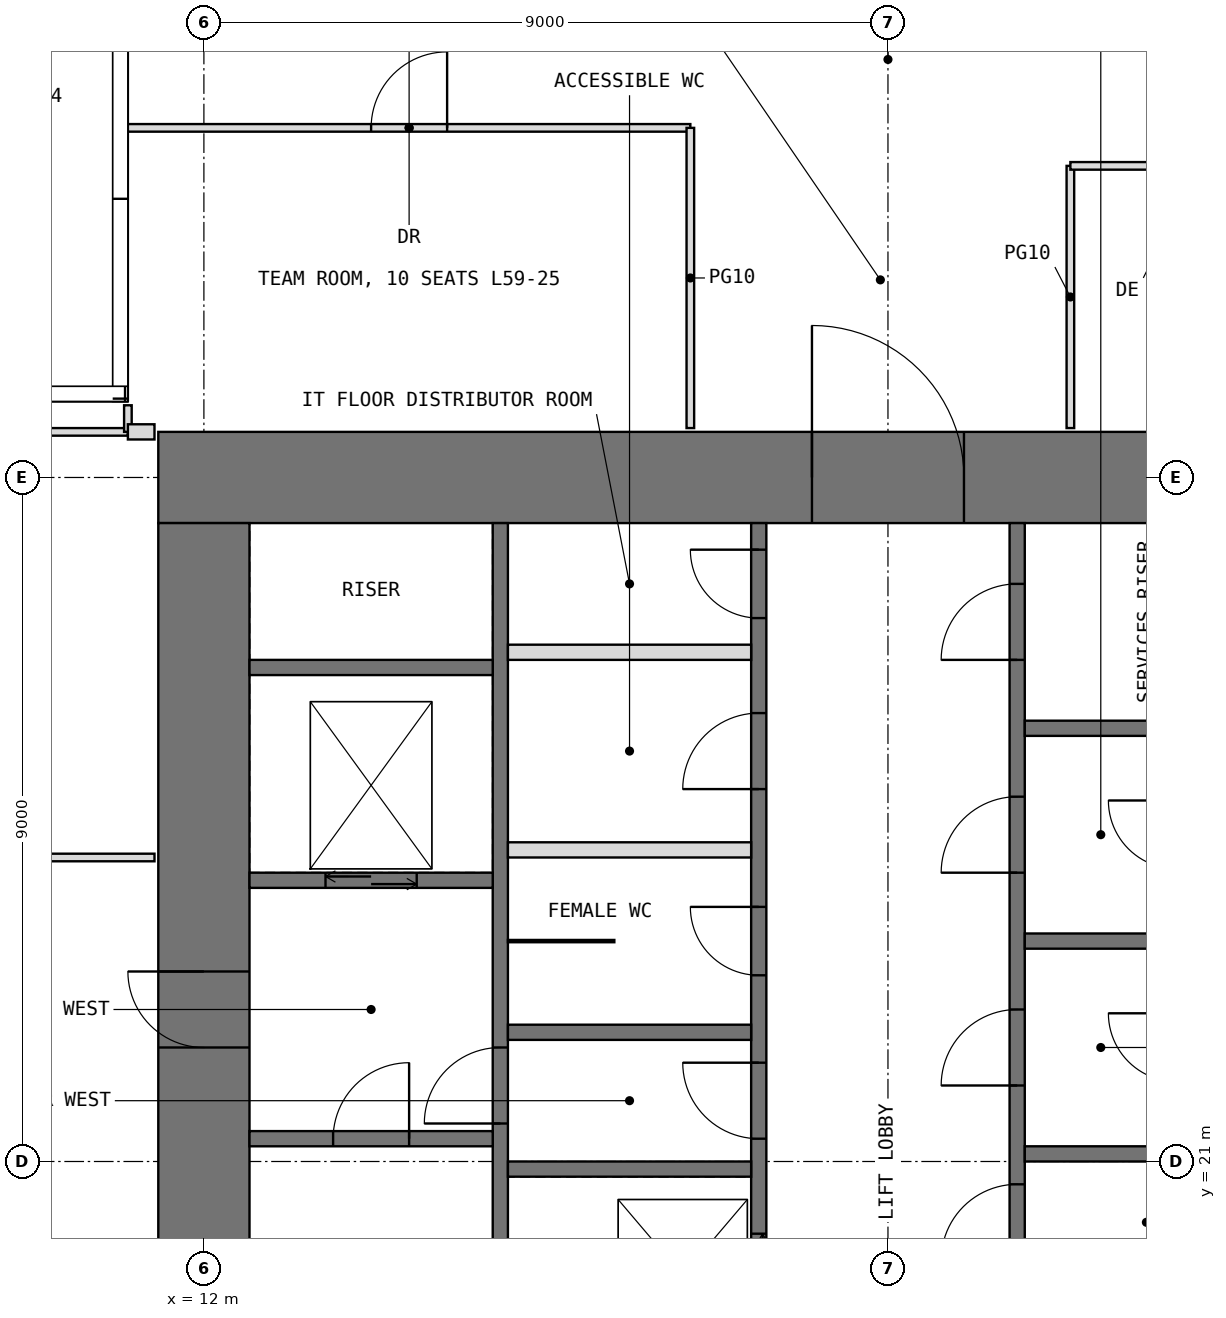
"""IFC4 building model, lengths in metres.
Left out: names, types, materials, properties, quantities, classifications, styles, units other than length and angle.
Written with IfcOpenShell. Run it as: python <this file> out.ifc"""

import sys

from ifc_helpers import new_model, si_unit, direction, frame, frame_2d, origin, place, context, subcontext, project, spatial, rectangle, extrude, element, fill, save


model = new_model("IFC4")
c1 = context("Model", 3, precision=1e-05, world=origin(), true_north=direction((0.0, 1.0)))
c2 = subcontext(c1, "Body", "Model", "MODEL_VIEW")
j1 = project(units=[si_unit("LENGTHUNIT", "METRE"), si_unit("PLANEANGLEUNIT", "RADIAN")], contexts=[c1])
p1 = place(None, origin())
s1 = spatial("IfcSite", under=j1, at=p1, CompositionType="ELEMENT")
p2 = place(p1, origin())
s2 = spatial("IfcBuilding", under=s1, at=p2, CompositionType="ELEMENT")
p3 = place(p2, frame((0.0, 0.0, 248.2)))
s3 = spatial("IfcBuildingStorey", under=s2, at=p3, CompositionType="ELEMENT", Elevation=248.2)
p4 = place(p3, frame((11.4, 30.0, -0.05), z_axis=(0.0, 0.0, 1.0), x_axis=(1.0, 0.0, 0.0)))
e1 = element("IfcWall", 1, at=p4, inside=s3, PredefinedType="SHEAR", context=c2, shape_type="SweptSolid", body=[
    extrude(rectangle(XDim=19.2, YDim=1.2, at=frame_2d((9.6, 0.0))), origin(), (0.0, 0.0, 1.0), 4.2),
])
p5 = place(p4, frame((8.6, 0.0, 0.05)))
e2 = element("IfcOpeningElement", 2, at=p5, cuts=e1, PredefinedType="OPENING", context=c2, shape_type="SweptSolid", body=[
    extrude(rectangle(XDim=2.0, YDim=2.2, at=frame_2d((1.0, 1.1))), frame((0.0, 0.61, 0.0), z_axis=(0.0, -1.0, 0.0), x_axis=(1.0, 0.0, 0.0)), (0.0, 0.0, 1.0), 1.22),
])
p6 = place(p3, frame((12.0, 12.6, -0.05), z_axis=(0.0, 0.0, 1.0), x_axis=(0.0, 1.0, 0.0)))
e3 = element("IfcWall", 3, at=p6, inside=s3, PredefinedType="SHEAR", context=c2, shape_type="SweptSolid", body=[
    extrude(rectangle(XDim=16.8, YDim=1.2, at=frame_2d((8.4, 0.0))), origin(), (0.0, 0.0, 1.0), 4.2),
])
p7 = place(p6, frame((9.9, 0.0, 0.05)))
e4 = element("IfcOpeningElement", 4, at=p7, cuts=e3, PredefinedType="OPENING", context=c2, shape_type="SweptSolid", body=[
    extrude(rectangle(XDim=1.0, YDim=2.2, at=frame_2d((0.5, 1.1))), frame((0.0, 0.61, 0.0), z_axis=(0.0, -1.0, 0.0), x_axis=(1.0, 0.0, 0.0)), (0.0, 0.0, 1.0), 1.22),
])
p8 = place(p3, frame((15.9, 12.6, -0.05), z_axis=(0.0, 0.0, 1.0), x_axis=(0.0, 1.0, 0.0)))
e5 = element("IfcWall", 5, at=p8, inside=s3, PredefinedType="SHEAR", context=c2, shape_type="SweptSolid", body=[
    extrude(rectangle(XDim=16.8, YDim=0.2, at=frame_2d((8.4, 0.0))), origin(), (0.0, 0.0, 1.0), 4.2),
])
p9 = place(p8, frame((8.9, 0.0, 0.05)))
e6 = element("IfcOpeningElement", 6, at=p9, cuts=e5, PredefinedType="OPENING", context=c2, shape_type="SweptSolid", body=[
    extrude(rectangle(XDim=1.0, YDim=2.2, at=frame_2d((0.5, 1.1))), frame((0.0, 0.11, 0.0), z_axis=(0.0, -1.0, 0.0), x_axis=(1.0, 0.0, 0.0)), (0.0, 0.0, 1.0), 0.22),
])
p10 = place(p3, frame((19.3, 12.6, -0.05), z_axis=(0.0, 0.0, 1.0), x_axis=(0.0, 1.0, 0.0)))
e7 = element("IfcWall", 7, at=p10, inside=s3, PredefinedType="SHEAR", context=c2, shape_type="SweptSolid", body=[
    extrude(rectangle(XDim=16.8, YDim=0.2, at=frame_2d((8.4, 0.0))), origin(), (0.0, 0.0, 1.0), 4.2),
])
p11 = place(p10, frame((8.7, 0.0, 0.05)))
e8 = element("IfcOpeningElement", 8, at=p11, cuts=e7, PredefinedType="OPENING", context=c2, shape_type="SweptSolid", body=[
    extrude(rectangle(XDim=1.0, YDim=2.2, at=frame_2d((0.5, 1.1))), frame((0.0, 0.11, 0.0), z_axis=(0.0, -1.0, 0.0), x_axis=(1.0, 0.0, 0.0)), (0.0, 0.0, 1.0), 0.22),
])
p12 = place(p10, frame((10.85, 0.0, 0.05)))
e9 = element("IfcOpeningElement", 9, at=p12, cuts=e7, PredefinedType="OPENING", context=c2, shape_type="SweptSolid", body=[
    extrude(rectangle(XDim=0.9, YDim=2.2, at=frame_2d((0.45, 1.1))), frame((0.0, 0.11, 0.0), z_axis=(0.0, -1.0, 0.0), x_axis=(1.0, 0.0, 0.0)), (0.0, 0.0, 1.0), 0.22),
])
p13 = place(p10, frame((13.3, 0.0, 0.05)))
e10 = element("IfcOpeningElement", 10, at=p13, cuts=e7, PredefinedType="OPENING", context=c2, shape_type="SweptSolid", body=[
    extrude(rectangle(XDim=1.0, YDim=2.2, at=frame_2d((0.5, 1.1))), frame((0.0, 0.11, 0.0), z_axis=(0.0, -1.0, 0.0), x_axis=(1.0, 0.0, 0.0)), (0.0, 0.0, 1.0), 0.22),
])
p14 = place(p10, frame((15.55, 0.0, 0.05)))
e11 = element("IfcOpeningElement", 11, at=p14, cuts=e7, PredefinedType="OPENING", context=c2, shape_type="SweptSolid", body=[
    extrude(rectangle(XDim=0.9, YDim=2.2, at=frame_2d((0.45, 1.1))), frame((0.0, 0.11, 0.0), z_axis=(0.0, -1.0, 0.0), x_axis=(1.0, 0.0, 0.0)), (0.0, 0.0, 1.0), 0.22),
])
p15 = place(p10, frame((0.75, 0.0, 0.05)))
e12 = element("IfcOpeningElement", 12, at=p15, cuts=e7, PredefinedType="OPENING", context=c2, shape_type="SweptSolid", body=[
    extrude(rectangle(XDim=1.1, YDim=2.2, at=frame_2d((0.55, 1.1))), frame((0.0, 0.11, 0.0), z_axis=(0.0, -1.0, 0.0), x_axis=(1.0, 0.0, 0.0)), (0.0, 0.0, 1.0), 0.22),
])
p16 = place(p10, frame((3.55, 0.0, 0.05)))
e13 = element("IfcOpeningElement", 13, at=p16, cuts=e7, PredefinedType="OPENING", context=c2, shape_type="SweptSolid", body=[
    extrude(rectangle(XDim=1.1, YDim=2.2, at=frame_2d((0.55, 1.1))), frame((0.0, 0.11, 0.0), z_axis=(0.0, -1.0, 0.0), x_axis=(1.0, 0.0, 0.0)), (0.0, 0.0, 1.0), 0.22),
])
p17 = place(p10, frame((6.35, 0.0, 0.05)))
e14 = element("IfcOpeningElement", 14, at=p17, cuts=e7, PredefinedType="OPENING", context=c2, shape_type="SweptSolid", body=[
    extrude(rectangle(XDim=1.1, YDim=2.2, at=frame_2d((0.55, 1.1))), frame((0.0, 0.11, 0.0), z_axis=(0.0, -1.0, 0.0), x_axis=(1.0, 0.0, 0.0)), (0.0, 0.0, 1.0), 0.22),
])
p18 = place(p3, frame((22.7, 12.6, -0.05), z_axis=(0.0, 0.0, 1.0), x_axis=(0.0, 1.0, 0.0)))
e15 = element("IfcWall", 15, at=p18, inside=s3, PredefinedType="SHEAR", context=c2, shape_type="SweptSolid", body=[
    extrude(rectangle(XDim=16.8, YDim=0.2, at=frame_2d((8.4, 0.0))), origin(), (0.0, 0.0, 1.0), 4.2),
])
p19 = place(p18, frame((0.45, 0.0, 0.05)))
e16 = element("IfcOpeningElement", 16, at=p19, cuts=e15, PredefinedType="OPENING", context=c2, shape_type="SweptSolid", body=[
    extrude(rectangle(XDim=0.9, YDim=2.2, at=frame_2d((0.45, 1.1))), frame((0.0, 0.11, 0.0), z_axis=(0.0, -1.0, 0.0), x_axis=(1.0, 0.0, 0.0)), (0.0, 0.0, 1.0), 0.22),
])
p20 = place(p18, frame((7.1, 0.0, 0.05)))
e17 = element("IfcOpeningElement", 17, at=p20, cuts=e15, PredefinedType="OPENING", context=c2, shape_type="SweptSolid", body=[
    extrude(rectangle(XDim=1.0, YDim=2.2, at=frame_2d((0.5, 1.1))), frame((0.0, 0.11, 0.0), z_axis=(0.0, -1.0, 0.0), x_axis=(1.0, 0.0, 0.0)), (0.0, 0.0, 1.0), 0.22),
])
p21 = place(p18, frame((1.95, 0.0, 0.05)))
e18 = element("IfcOpeningElement", 18, at=p21, cuts=e15, PredefinedType="OPENING", context=c2, shape_type="SweptSolid", body=[
    extrude(rectangle(XDim=0.9, YDim=2.2, at=frame_2d((0.45, 1.1))), frame((0.0, 0.11, 0.0), z_axis=(0.0, -1.0, 0.0), x_axis=(1.0, 0.0, 0.0)), (0.0, 0.0, 1.0), 0.22),
])
p22 = place(p18, frame((4.95, 0.0, 0.05)))
e19 = element("IfcOpeningElement", 19, at=p22, cuts=e15, PredefinedType="OPENING", context=c2, shape_type="SweptSolid", body=[
    extrude(rectangle(XDim=0.9, YDim=2.2, at=frame_2d((0.45, 1.1))), frame((0.0, 0.11, 0.0), z_axis=(0.0, -1.0, 0.0), x_axis=(1.0, 0.0, 0.0)), (0.0, 0.0, 1.0), 0.22),
])
p23 = place(p18, frame((9.4, 0.0, 0.05)))
e20 = element("IfcOpeningElement", 20, at=p23, cuts=e15, PredefinedType="OPENING", context=c2, shape_type="SweptSolid", body=[
    extrude(rectangle(XDim=1.0, YDim=2.2, at=frame_2d((0.5, 1.1))), frame((0.0, 0.11, 0.0), z_axis=(0.0, -1.0, 0.0), x_axis=(1.0, 0.0, 0.0)), (0.0, 0.0, 1.0), 0.22),
])
p24 = place(p18, frame((12.2, 0.0, 0.05)))
e21 = element("IfcOpeningElement", 21, at=p24, cuts=e15, PredefinedType="OPENING", context=c2, shape_type="SweptSolid", body=[
    extrude(rectangle(XDim=1.0, YDim=2.2, at=frame_2d((0.5, 1.1))), frame((0.0, 0.11, 0.0), z_axis=(0.0, -1.0, 0.0), x_axis=(1.0, 0.0, 0.0)), (0.0, 0.0, 1.0), 0.22),
])
p25 = place(p18, frame((15.0, 0.0, 0.05)))
e22 = element("IfcOpeningElement", 22, at=p25, cuts=e15, PredefinedType="OPENING", context=c2, shape_type="SweptSolid", body=[
    extrude(rectangle(XDim=1.0, YDim=2.2, at=frame_2d((0.5, 1.1))), frame((0.0, 0.11, 0.0), z_axis=(0.0, -1.0, 0.0), x_axis=(1.0, 0.0, 0.0)), (0.0, 0.0, 1.0), 0.22),
])
p26 = place(p3, frame((12.6, 21.3, -0.05), z_axis=(0.0, 0.0, 1.0), x_axis=(1.0, 0.0, 0.0)))
e23 = element("IfcWall", 23, at=p26, inside=s3, PredefinedType="SHEAR", context=c2, shape_type="SweptSolid", body=[
    extrude(rectangle(XDim=3.2, YDim=0.2, at=frame_2d((1.6, 0.0))), origin(), (0.0, 0.0, 1.0), 4.2),
])
p27 = place(p26, frame((1.1, 0.0, 0.05)))
e24 = element("IfcOpeningElement", 24, at=p27, cuts=e23, PredefinedType="OPENING", context=c2, shape_type="SweptSolid", body=[
    extrude(rectangle(XDim=1.0, YDim=2.2, at=frame_2d((0.5, 1.1))), frame((0.0, 0.11, 0.0), z_axis=(0.0, -1.0, 0.0), x_axis=(1.0, 0.0, 0.0)), (0.0, 0.0, 1.0), 0.22),
])
p28 = place(p3, frame((12.6, 24.7, -0.05), z_axis=(0.0, 0.0, 1.0), x_axis=(1.0, 0.0, 0.0)))
e25 = element("IfcWall", 25, at=p28, inside=s3, PredefinedType="SHEAR", context=c2, shape_type="SweptSolid", body=[
    extrude(rectangle(XDim=3.2, YDim=0.2, at=frame_2d((1.6, 0.0))), origin(), (0.0, 0.0, 1.0), 4.2),
])
p29 = place(p28, frame((1.0, 0.0, 0.05)))
e26 = element("IfcOpeningElement", 26, at=p29, cuts=e25, PredefinedType="OPENING", context=c2, shape_type="SweptSolid", body=[
    extrude(rectangle(XDim=1.2, YDim=2.2, at=frame_2d((0.6, 1.1))), frame((0.0, 0.11, 0.0), z_axis=(0.0, -1.0, 0.0), x_axis=(1.0, 0.0, 0.0)), (0.0, 0.0, 1.0), 0.22),
])
for number, where, z_axis, x_axis in (
    (27, (12.6, 27.5, -0.05), (0.0, 0.0, 1.0), (1.0, 0.0, 0.0)),
    (28, (16.0, 20.9, -0.05), (0.0, 0.0, 1.0), (1.0, 0.0, 0.0)),
    (29, (16.0, 22.7, -0.05), (0.0, 0.0, 1.0), (1.0, 0.0, 0.0)),
):
    element("IfcWall", number, at=place(p3, frame(where, z_axis=z_axis, x_axis=x_axis)), inside=s3, PredefinedType="SHEAR", context=c2, shape_type="SweptSolid", body=[
        extrude(rectangle(XDim=3.2, YDim=0.2, at=frame_2d((1.6, 0.0))), origin(), (0.0, 0.0, 1.0), 4.2),
    ])
for number, where, z_axis, x_axis in (
    (30, (16.0, 25.1, 0.0), (0.0, 0.0, 1.0), (1.0, 0.0, 0.0)),
    (31, (16.0, 27.7, 0.0), (0.0, 0.0, 1.0), (1.0, 0.0, 0.0)),
):
    element("IfcWall", number, at=place(p3, frame(where, z_axis=z_axis, x_axis=x_axis)), inside=s3, PredefinedType="PARTITIONING", context=c2, shape_type="SweptSolid", body=[
        extrude(rectangle(XDim=3.2, YDim=0.2, at=frame_2d((1.6, 0.0))), origin(), (0.0, 0.0, 1.0), 3.95),
    ])
for number, where, z_axis, x_axis in (
    (32, (22.8, 21.1, -0.05), (0.0, 0.0, 1.0), (1.0, 0.0, 0.0)),
    (33, (22.8, 23.9, -0.05), (0.0, 0.0, 1.0), (1.0, 0.0, 0.0)),
    (34, (22.8, 26.7, -0.05), (0.0, 0.0, 1.0), (1.0, 0.0, 0.0)),
):
    element("IfcWall", number, at=place(p3, frame(where, z_axis=z_axis, x_axis=x_axis)), inside=s3, PredefinedType="SHEAR", context=c2, shape_type="SweptSolid", body=[
        extrude(rectangle(XDim=3.2, YDim=0.2, at=frame_2d((1.6, 0.0))), origin(), (0.0, 0.0, 1.0), 4.2),
    ])
p30 = place(p3, frame((16.0, 23.9, 0.0), z_axis=(0.0, 0.0, 1.0), x_axis=(1.0, 0.0, 0.0)))
e35 = element("IfcWall", 35, at=p30, inside=s3, PredefinedType="PARTITIONING", context=c2, shape_type="SweptSolid", body=[
    extrude(rectangle(XDim=1.4, YDim=0.03, at=frame_2d((0.7, 0.0))), origin(), (0.0, 0.0, 1.0), 3.95),
])
p31 = place(p3, frame((8.0, 25.0, 0.0), z_axis=(0.0, 0.0, 1.0), x_axis=(1.0, 0.0, 0.0)))
e36 = element("IfcWall", 36, at=p31, inside=s3, PredefinedType="PARTITIONING", context=c2, shape_type="SweptSolid", body=[
    extrude(rectangle(XDim=3.35, YDim=0.1, at=frame_2d((1.675, 0.0))), origin(), (0.0, 0.0, 1.0), 3.95),
])
p32 = place(p3, frame((8.0, 30.6, 0.0), z_axis=(0.0, 0.0, 1.0), x_axis=(1.0, 0.0, 0.0)))
e37 = element("IfcWall", 37, at=p32, inside=s3, PredefinedType="PARTITIONING", context=c2, shape_type="SweptSolid", body=[
    extrude(rectangle(XDim=3.0, YDim=0.1, at=frame_2d((1.5, 0.0))), origin(), (0.0, 0.0, 1.0), 3.95),
])
p33 = place(p3, frame((11.0, 30.6, 0.0), z_axis=(0.0, 0.0, 1.0), x_axis=(0.0, 1.0, 0.0)))
e38 = element("IfcWall", 38, at=p33, inside=s3, PredefinedType="PARTITIONING", context=c2, shape_type="SweptSolid", body=[
    extrude(rectangle(XDim=0.35, YDim=0.1, at=frame_2d((0.175, 0.0))), origin(), (0.0, 0.0, 1.0), 3.95),
])
p34 = place(p3, frame((11.0, 30.6, 0.0), z_axis=(0.0, 0.0, 1.0), x_axis=(1.0, 0.0, 0.0)))
e39 = element("IfcWall", 39, at=p34, inside=s3, PredefinedType="PARTITIONING", context=c2, shape_type="SweptSolid", body=[
    extrude(rectangle(XDim=0.35, YDim=0.2, at=frame_2d((0.175, 0.0))), origin(), (0.0, 0.0, 1.0), 3.95),
])
p35 = place(p3, frame((11.0, 34.6, 0.0), z_axis=(0.0, 0.0, 1.0), x_axis=(1.0, 0.0, 0.0)))
e40 = element("IfcWall", 40, at=p35, inside=s3, PredefinedType="PARTITIONING", context=c2, shape_type="SweptSolid", body=[
    extrude(rectangle(XDim=7.4, YDim=0.1, at=frame_2d((3.7, 0.0))), origin(), (0.0, 0.0, 1.0), 3.95),
])
p36 = place(p35, frame((3.2, 0.0, 0.0)))
e41 = element("IfcOpeningElement", 41, at=p36, cuts=e40, PredefinedType="OPENING", context=c2, shape_type="SweptSolid", body=[
    extrude(rectangle(XDim=1.0, YDim=2.2, at=frame_2d((0.5, 1.1))), frame((0.0, 0.06, 0.0), z_axis=(0.0, -1.0, 0.0), x_axis=(1.0, 0.0, 0.0)), (0.0, 0.0, 1.0), 0.12),
])
p37 = place(p3, frame((18.4, 30.65, 0.0), z_axis=(0.0, 0.0, 1.0), x_axis=(0.0, 1.0, 0.0)))
e42 = element("IfcWall", 42, at=p37, inside=s3, PredefinedType="PARTITIONING", context=c2, shape_type="SweptSolid", body=[
    extrude(rectangle(XDim=3.95, YDim=0.1, at=frame_2d((1.975, 0.0))), origin(), (0.0, 0.0, 1.0), 3.95),
])
p38 = place(p3, frame((23.4, 30.65, 0.0), z_axis=(0.0, 0.0, 1.0), x_axis=(0.0, 1.0, 0.0)))
e43 = element("IfcWall", 43, at=p38, inside=s3, PredefinedType="PARTITIONING", context=c2, shape_type="SweptSolid", body=[
    extrude(rectangle(XDim=3.45, YDim=0.1, at=frame_2d((1.725, 0.0))), origin(), (0.0, 0.0, 1.0), 3.95),
])
p39 = place(p3, frame((23.4, 34.1, 0.0), z_axis=(0.0, 0.0, 1.0), x_axis=(1.0, 0.0, 0.0)))
e44 = element("IfcWall", 44, at=p39, inside=s3, PredefinedType="PARTITIONING", context=c2, shape_type="SweptSolid", body=[
    extrude(rectangle(XDim=3.4, YDim=0.1, at=frame_2d((1.7, 0.0))), origin(), (0.0, 0.0, 1.0), 3.95),
])
p40 = place(p39, frame((1.15, 0.0, 0.0)))
e45 = element("IfcOpeningElement", 45, at=p40, cuts=e44, PredefinedType="OPENING", context=c2, shape_type="SweptSolid", body=[
    extrude(rectangle(XDim=1.1, YDim=2.3, at=frame_2d((0.55, 1.15))), frame((0.0, 0.06, 0.0), z_axis=(0.0, -1.0, 0.0), x_axis=(1.0, 0.0, 0.0)), (0.0, 0.0, 1.0), 0.12),
])
p41 = place(p5, origin())
e46 = element("IfcDoor", 46, at=p41, inside=s3, OperationType="DOUBLE_DOOR_SINGLE_SWING", PredefinedType="DOOR", context=c2, shape_type="SweptSolid", body=[
    extrude(rectangle(XDim=2.0, YDim=2.2, at=frame_2d((1.0, 1.1))), frame((0.0, 0.025, 0.0), z_axis=(0.0, -1.0, 0.0), x_axis=(1.0, 0.0, 0.0)), (0.0, 0.0, 1.0), 0.05),
])
fill(e2, e46)
p42 = place(p7, origin())
e47 = element("IfcDoor", 47, at=p42, inside=s3, OperationType="SINGLE_SWING_RIGHT", PredefinedType="DOOR", context=c2, shape_type="SweptSolid", body=[
    extrude(rectangle(XDim=1.0, YDim=2.2, at=frame_2d((0.5, 1.1))), frame((0.0, 0.025, 0.0), z_axis=(0.0, -1.0, 0.0), x_axis=(1.0, 0.0, 0.0)), (0.0, 0.0, 1.0), 0.05),
])
fill(e4, e47)
p43 = place(p27, origin())
e48 = element("IfcDoor", 48, at=p43, inside=s3, OperationType="SINGLE_SWING_RIGHT", PredefinedType="DOOR", context=c2, shape_type="SweptSolid", body=[
    extrude(rectangle(XDim=1.0, YDim=2.2, at=frame_2d((0.5, 1.1))), frame((0.0, 0.025, 0.0), z_axis=(0.0, -1.0, 0.0), x_axis=(1.0, 0.0, 0.0)), (0.0, 0.0, 1.0), 0.05),
])
fill(e24, e48)
p44 = place(p9, origin())
e49 = element("IfcDoor", 49, at=p44, inside=s3, OperationType="SINGLE_SWING_LEFT", PredefinedType="DOOR", context=c2, shape_type="SweptSolid", body=[
    extrude(rectangle(XDim=1.0, YDim=2.2, at=frame_2d((0.5, 1.1))), frame((0.0, 0.025, 0.0), z_axis=(0.0, -1.0, 0.0), x_axis=(1.0, 0.0, 0.0)), (0.0, 0.0, 1.0), 0.05),
])
fill(e6, e49)
p45 = place(p11, origin())
e50 = element("IfcDoor", 50, at=p45, inside=s3, OperationType="SINGLE_SWING_RIGHT", PredefinedType="DOOR", context=c2, shape_type="SweptSolid", body=[
    extrude(rectangle(XDim=1.0, YDim=2.2, at=frame_2d((0.5, 1.1))), frame((0.0, 0.025, 0.0), z_axis=(0.0, -1.0, 0.0), x_axis=(1.0, 0.0, 0.0)), (0.0, 0.0, 1.0), 0.05),
])
fill(e8, e50)
p46 = place(p20, origin())
e51 = element("IfcDoor", 51, at=p46, inside=s3, OperationType="SINGLE_SWING_LEFT", PredefinedType="DOOR", context=c2, shape_type="SweptSolid", body=[
    extrude(rectangle(XDim=1.0, YDim=2.2, at=frame_2d((0.5, 1.1))), frame((0.0, 0.025, 0.0), z_axis=(0.0, -1.0, 0.0), x_axis=(1.0, 0.0, 0.0)), (0.0, 0.0, 1.0), 0.05),
])
fill(e17, e51)
p47 = place(p12, origin())
e52 = element("IfcDoor", 52, at=p47, inside=s3, OperationType="SINGLE_SWING_RIGHT", PredefinedType="DOOR", context=c2, shape_type="SweptSolid", body=[
    extrude(rectangle(XDim=0.9, YDim=2.2, at=frame_2d((0.45, 1.1))), frame((0.0, 0.025, 0.0), z_axis=(0.0, -1.0, 0.0), x_axis=(1.0, 0.0, 0.0)), (0.0, 0.0, 1.0), 0.05),
])
fill(e9, e52)
p48 = place(p13, origin())
e53 = element("IfcDoor", 53, at=p48, inside=s3, OperationType="SINGLE_SWING_LEFT", PredefinedType="DOOR", context=c2, shape_type="SweptSolid", body=[
    extrude(rectangle(XDim=1.0, YDim=2.2, at=frame_2d((0.5, 1.1))), frame((0.0, 0.025, 0.0), z_axis=(0.0, -1.0, 0.0), x_axis=(1.0, 0.0, 0.0)), (0.0, 0.0, 1.0), 0.05),
])
fill(e10, e53)
p49 = place(p14, origin())
e54 = element("IfcDoor", 54, at=p49, inside=s3, OperationType="SINGLE_SWING_RIGHT", PredefinedType="DOOR", context=c2, shape_type="SweptSolid", body=[
    extrude(rectangle(XDim=0.9, YDim=2.2, at=frame_2d((0.45, 1.1))), frame((0.0, 0.025, 0.0), z_axis=(0.0, -1.0, 0.0), x_axis=(1.0, 0.0, 0.0)), (0.0, 0.0, 1.0), 0.05),
])
fill(e11, e54)
p50 = place(p23, origin())
e55 = element("IfcDoor", 55, at=p50, inside=s3, OperationType="SINGLE_SWING_LEFT", PredefinedType="DOOR", context=c2, shape_type="SweptSolid", body=[
    extrude(rectangle(XDim=1.0, YDim=2.2, at=frame_2d((0.5, 1.1))), frame((0.0, 0.025, 0.0), z_axis=(0.0, -1.0, 0.0), x_axis=(1.0, 0.0, 0.0)), (0.0, 0.0, 1.0), 0.05),
])
fill(e20, e55)
p51 = place(p24, origin())
e56 = element("IfcDoor", 56, at=p51, inside=s3, OperationType="SINGLE_SWING_LEFT", PredefinedType="DOOR", context=c2, shape_type="SweptSolid", body=[
    extrude(rectangle(XDim=1.0, YDim=2.2, at=frame_2d((0.5, 1.1))), frame((0.0, 0.025, 0.0), z_axis=(0.0, -1.0, 0.0), x_axis=(1.0, 0.0, 0.0)), (0.0, 0.0, 1.0), 0.05),
])
fill(e21, e56)
p52 = place(p25, origin())
e57 = element("IfcDoor", 57, at=p52, inside=s3, OperationType="SINGLE_SWING_LEFT", PredefinedType="DOOR", context=c2, shape_type="SweptSolid", body=[
    extrude(rectangle(XDim=1.0, YDim=2.2, at=frame_2d((0.5, 1.1))), frame((0.0, 0.025, 0.0), z_axis=(0.0, -1.0, 0.0), x_axis=(1.0, 0.0, 0.0)), (0.0, 0.0, 1.0), 0.05),
])
fill(e22, e57)
p53 = place(p36, origin())
e58 = element("IfcDoor", 58, at=p53, inside=s3, OperationType="SINGLE_SWING_RIGHT", PredefinedType="DOOR", context=c2, shape_type="SweptSolid", body=[
    extrude(rectangle(XDim=1.0, YDim=2.2, at=frame_2d((0.5, 1.1))), frame((0.0, 0.025, 0.0), z_axis=(0.0, -1.0, 0.0), x_axis=(1.0, 0.0, 0.0)), (0.0, 0.0, 1.0), 0.05),
])
fill(e41, e58)
p54 = place(p17, origin())
e59 = element("IfcDoor", 59, at=p54, inside=s3, OperationType="DOUBLE_DOOR_SLIDING", PredefinedType="DOOR", context=c2, shape_type="SweptSolid", body=[
    extrude(rectangle(XDim=1.1, YDim=2.2, at=frame_2d((0.55, 1.1))), frame((0.0, 0.025, 0.0), z_axis=(0.0, -1.0, 0.0), x_axis=(1.0, 0.0, 0.0)), (0.0, 0.0, 1.0), 0.05),
])
fill(e14, e59)
p55 = place(p29, origin())
e60 = element("IfcDoor", 60, at=p55, inside=s3, OperationType="DOUBLE_DOOR_SLIDING", PredefinedType="DOOR", context=c2, shape_type="SweptSolid", body=[
    extrude(rectangle(XDim=1.2, YDim=2.2, at=frame_2d((0.6, 1.1))), frame((0.0, 0.025, 0.0), z_axis=(0.0, -1.0, 0.0), x_axis=(1.0, 0.0, 0.0)), (0.0, 0.0, 1.0), 0.05),
])
fill(e26, e60)
save(model, sys.argv[1])
